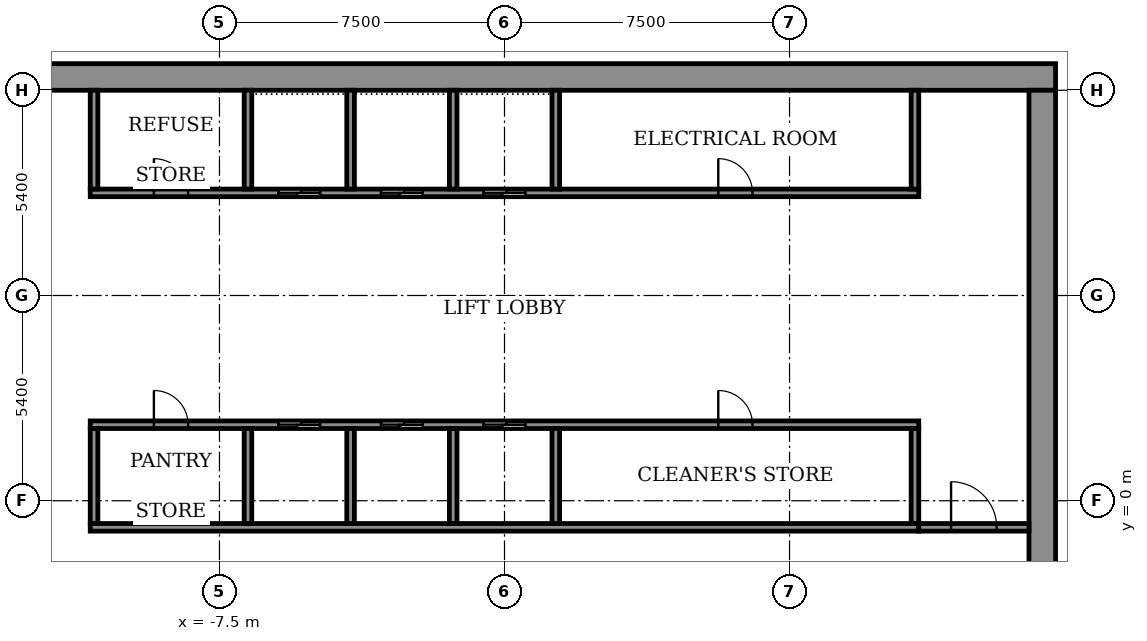
"""IFC4 building model, lengths in metres.
Left out: names, types, materials, properties, quantities, classifications, styles, units other than length and angle.
Written with IfcOpenShell. Run it as: python <this file> out.ifc"""

import sys

from ifc_helpers import new_model, si_unit, direction, frame, frame_2d, origin, place, context, subcontext, project, spatial, rectangle, extrude, element, fill, save


model = new_model("IFC4")
c1 = context("Model", 3, precision=1e-05, world=origin(), true_north=direction((0.0, 1.0)))
c2 = subcontext(c1, "Body", "Model", "MODEL_VIEW")
j1 = project(units=[si_unit("LENGTHUNIT", "METRE"), si_unit("PLANEANGLEUNIT", "RADIAN")], contexts=[c1])
p1 = place(None, origin())
s1 = spatial("IfcSite", under=j1, at=p1, CompositionType="ELEMENT")
p2 = place(p1, origin())
s2 = spatial("IfcBuilding", under=s1, at=p2, CompositionType="ELEMENT")
p3 = place(p2, frame((0.0, 0.0, 287.1)))
s3 = spatial("IfcBuildingStorey", under=s2, at=p3, CompositionType="ELEMENT", Elevation=287.1)
p4 = place(p3, frame((-14.5, 11.15, 0.0), z_axis=(0.0, 0.0, 1.0), x_axis=(1.0, 0.0, 0.0)))
e1 = element("IfcWall", 1, at=p4, inside=s3, PredefinedType="SHEAR", context=c2, shape_type="SweptSolid", body=[
    extrude(rectangle(XDim=29.0, YDim=0.7, at=frame_2d((14.5, 0.0))), origin(), (0.0, 0.0, 1.0), 3.6),
])
p5 = place(p3, frame((14.15, -10.8, 0.0), z_axis=(0.0, 0.0, 1.0), x_axis=(0.0, 1.0, 0.0)))
e2 = element("IfcWall", 2, at=p5, inside=s3, PredefinedType="SHEAR", context=c2, shape_type="SweptSolid", body=[
    extrude(rectangle(XDim=21.6, YDim=0.7, at=frame_2d((10.8, 0.0))), origin(), (0.0, 0.0, 1.0), 3.6),
])
p6 = place(p5, frame((1.2, 0.0, 0.0)))
e3 = element("IfcOpeningElement", 3, at=p6, cuts=e2, PredefinedType="OPENING", context=c2, shape_type="SweptSolid", body=[
    extrude(rectangle(XDim=1.2, YDim=2.1, at=frame_2d((0.6, 1.05))), frame((0.0, 0.36, 0.0), z_axis=(0.0, -1.0, 0.0), x_axis=(1.0, 0.0, 0.0)), (0.0, 0.0, 1.0), 0.72),
])
p7 = place(p3, frame((-10.9, -0.7, 0.0), z_axis=(0.0, 0.0, 1.0), x_axis=(1.0, 0.0, 0.0)))
e4 = element("IfcWall", 4, at=p7, inside=s3, PredefinedType="SHEAR", context=c2, shape_type="SweptSolid", body=[
    extrude(rectangle(XDim=21.8, YDim=0.2, at=frame_2d((10.9, 0.0))), origin(), (0.0, 0.0, 1.0), 3.05),
])
p8 = place(p3, frame((-10.9, 2.0, 0.0), z_axis=(0.0, 0.0, 1.0), x_axis=(1.0, 0.0, 0.0)))
e5 = element("IfcWall", 5, at=p8, inside=s3, PredefinedType="SHEAR", context=c2, shape_type="SweptSolid", body=[
    extrude(rectangle(XDim=21.8, YDim=0.2, at=frame_2d((10.9, 0.0))), origin(), (0.0, 0.0, 1.0), 3.05),
])
p9 = place(p8, frame((4.95, 0.0, 0.0)))
e6 = element("IfcOpeningElement", 6, at=p9, cuts=e5, PredefinedType="OPENING", context=c2, shape_type="SweptSolid", body=[
    extrude(rectangle(XDim=1.1, YDim=2.1, at=frame_2d((0.55, 1.05))), frame((0.0, 0.11, 0.0), z_axis=(0.0, -1.0, 0.0), x_axis=(1.0, 0.0, 0.0)), (0.0, 0.0, 1.0), 0.22),
])
p10 = place(p8, frame((7.65, 0.0, 0.0)))
e7 = element("IfcOpeningElement", 7, at=p10, cuts=e5, PredefinedType="OPENING", context=c2, shape_type="SweptSolid", body=[
    extrude(rectangle(XDim=1.1, YDim=2.1, at=frame_2d((0.55, 1.05))), frame((0.0, 0.11, 0.0), z_axis=(0.0, -1.0, 0.0), x_axis=(1.0, 0.0, 0.0)), (0.0, 0.0, 1.0), 0.22),
])
p11 = place(p8, frame((10.35, 0.0, 0.0)))
e8 = element("IfcOpeningElement", 8, at=p11, cuts=e5, PredefinedType="OPENING", context=c2, shape_type="SweptSolid", body=[
    extrude(rectangle(XDim=1.1, YDim=2.1, at=frame_2d((0.55, 1.05))), frame((0.0, 0.11, 0.0), z_axis=(0.0, -1.0, 0.0), x_axis=(1.0, 0.0, 0.0)), (0.0, 0.0, 1.0), 0.22),
])
p12 = place(p8, frame((1.675, 0.0, 0.0)))
e9 = element("IfcOpeningElement", 9, at=p12, cuts=e5, PredefinedType="OPENING", context=c2, shape_type="SweptSolid", body=[
    extrude(rectangle(XDim=0.9, YDim=2.1, at=frame_2d((0.45, 1.05))), frame((0.0, 0.11, 0.0), z_axis=(0.0, -1.0, 0.0), x_axis=(1.0, 0.0, 0.0)), (0.0, 0.0, 1.0), 0.22),
])
p13 = place(p8, frame((16.525, 0.0, 0.0)))
e10 = element("IfcOpeningElement", 10, at=p13, cuts=e5, PredefinedType="OPENING", context=c2, shape_type="SweptSolid", body=[
    extrude(rectangle(XDim=0.9, YDim=2.1, at=frame_2d((0.45, 1.05))), frame((0.0, 0.11, 0.0), z_axis=(0.0, -1.0, 0.0), x_axis=(1.0, 0.0, 0.0)), (0.0, 0.0, 1.0), 0.22),
])
p14 = place(p3, frame((-10.9, 8.1, 0.0), z_axis=(0.0, 0.0, 1.0), x_axis=(1.0, 0.0, 0.0)))
e11 = element("IfcWall", 11, at=p14, inside=s3, PredefinedType="SHEAR", context=c2, shape_type="SweptSolid", body=[
    extrude(rectangle(XDim=21.8, YDim=0.2, at=frame_2d((10.9, 0.0))), origin(), (0.0, 0.0, 1.0), 3.05),
])
p15 = place(p14, frame((4.95, 0.0, 0.0)))
e12 = element("IfcOpeningElement", 12, at=p15, cuts=e11, PredefinedType="OPENING", context=c2, shape_type="SweptSolid", body=[
    extrude(rectangle(XDim=1.1, YDim=2.1, at=frame_2d((0.55, 1.05))), frame((0.0, 0.11, 0.0), z_axis=(0.0, -1.0, 0.0), x_axis=(1.0, 0.0, 0.0)), (0.0, 0.0, 1.0), 0.22),
])
p16 = place(p14, frame((7.65, 0.0, 0.0)))
e13 = element("IfcOpeningElement", 13, at=p16, cuts=e11, PredefinedType="OPENING", context=c2, shape_type="SweptSolid", body=[
    extrude(rectangle(XDim=1.1, YDim=2.1, at=frame_2d((0.55, 1.05))), frame((0.0, 0.11, 0.0), z_axis=(0.0, -1.0, 0.0), x_axis=(1.0, 0.0, 0.0)), (0.0, 0.0, 1.0), 0.22),
])
p17 = place(p14, frame((10.35, 0.0, 0.0)))
e14 = element("IfcOpeningElement", 14, at=p17, cuts=e11, PredefinedType="OPENING", context=c2, shape_type="SweptSolid", body=[
    extrude(rectangle(XDim=1.1, YDim=2.1, at=frame_2d((0.55, 1.05))), frame((0.0, 0.11, 0.0), z_axis=(0.0, -1.0, 0.0), x_axis=(1.0, 0.0, 0.0)), (0.0, 0.0, 1.0), 0.22),
])
p18 = place(p14, frame((1.675, 0.0, 0.0)))
e15 = element("IfcOpeningElement", 15, at=p18, cuts=e11, PredefinedType="OPENING", context=c2, shape_type="SweptSolid", body=[
    extrude(rectangle(XDim=0.9, YDim=2.1, at=frame_2d((0.45, 1.05))), frame((0.0, 0.11, 0.0), z_axis=(0.0, -1.0, 0.0), x_axis=(1.0, 0.0, 0.0)), (0.0, 0.0, 1.0), 0.22),
])
p19 = place(p14, frame((16.525, 0.0, 0.0)))
e16 = element("IfcOpeningElement", 16, at=p19, cuts=e11, PredefinedType="OPENING", context=c2, shape_type="SweptSolid", body=[
    extrude(rectangle(XDim=0.9, YDim=2.1, at=frame_2d((0.45, 1.05))), frame((0.0, 0.11, 0.0), z_axis=(0.0, -1.0, 0.0), x_axis=(1.0, 0.0, 0.0)), (0.0, 0.0, 1.0), 0.22),
])
p20 = place(p3, frame((-10.8, -0.6, 0.0), z_axis=(0.0, 0.0, 1.0), x_axis=(0.0, 1.0, 0.0)))
e17 = element("IfcWall", 17, at=p20, inside=s3, PredefinedType="STANDARD", context=c2, shape_type="SweptSolid", body=[
    extrude(rectangle(XDim=2.5, YDim=0.2, at=frame_2d((1.25, 0.0))), origin(), (0.0, 0.0, 1.0), 3.05),
])
for number, where, z_axis, x_axis in (
    (18, (-6.75, -0.6, 0.0), (0.0, 0.0, 1.0), (0.0, 1.0, 0.0)),
    (19, (-4.05, -0.6, 0.0), (0.0, 0.0, 1.0), (0.0, 1.0, 0.0)),
    (20, (-1.35, -0.6, 0.0), (0.0, 0.0, 1.0), (0.0, 1.0, 0.0)),
    (21, (1.35, -0.6, 0.0), (0.0, 0.0, 1.0), (0.0, 1.0, 0.0)),
):
    element("IfcWall", number, at=place(p3, frame(where, z_axis=z_axis, x_axis=x_axis)), inside=s3, PredefinedType="SHEAR", context=c2, shape_type="SweptSolid", body=[
        extrude(rectangle(XDim=2.5, YDim=0.2, at=frame_2d((1.25, 0.0))), origin(), (0.0, 0.0, 1.0), 3.05),
    ])
p21 = place(p3, frame((10.8, -0.6, 0.0), z_axis=(0.0, 0.0, 1.0), x_axis=(0.0, 1.0, 0.0)))
e22 = element("IfcWall", 22, at=p21, inside=s3, PredefinedType="STANDARD", context=c2, shape_type="SweptSolid", body=[
    extrude(rectangle(XDim=2.5, YDim=0.2, at=frame_2d((1.25, 0.0))), origin(), (0.0, 0.0, 1.0), 3.05),
])
p22 = place(p3, frame((-10.8, 8.2, 0.0), z_axis=(0.0, 0.0, 1.0), x_axis=(0.0, 1.0, 0.0)))
e23 = element("IfcWall", 23, at=p22, inside=s3, PredefinedType="STANDARD", context=c2, shape_type="SweptSolid", body=[
    extrude(rectangle(XDim=2.6, YDim=0.2, at=frame_2d((1.3, 0.0))), origin(), (0.0, 0.0, 1.0), 3.05),
])
for number, where, z_axis, x_axis in (
    (24, (-6.75, 8.2, 0.0), (0.0, 0.0, 1.0), (0.0, 1.0, 0.0)),
    (25, (-4.05, 8.2, 0.0), (0.0, 0.0, 1.0), (0.0, 1.0, 0.0)),
    (26, (-1.35, 8.2, 0.0), (0.0, 0.0, 1.0), (0.0, 1.0, 0.0)),
    (27, (1.35, 8.2, 0.0), (0.0, 0.0, 1.0), (0.0, 1.0, 0.0)),
):
    element("IfcWall", number, at=place(p3, frame(where, z_axis=z_axis, x_axis=x_axis)), inside=s3, PredefinedType="SHEAR", context=c2, shape_type="SweptSolid", body=[
        extrude(rectangle(XDim=2.6, YDim=0.2, at=frame_2d((1.3, 0.0))), origin(), (0.0, 0.0, 1.0), 3.05),
    ])
p23 = place(p3, frame((10.8, 8.2, 0.0), z_axis=(0.0, 0.0, 1.0), x_axis=(0.0, 1.0, 0.0)))
e28 = element("IfcWall", 28, at=p23, inside=s3, PredefinedType="STANDARD", context=c2, shape_type="SweptSolid", body=[
    extrude(rectangle(XDim=2.6, YDim=0.2, at=frame_2d((1.3, 0.0))), origin(), (0.0, 0.0, 1.0), 3.05),
])
p24 = place(p3, frame((10.9, -0.7, 0.0), z_axis=(0.0, 0.0, 1.0), x_axis=(1.0, 0.0, 0.0)))
e29 = element("IfcWall", 29, at=p24, inside=s3, PredefinedType="STANDARD", context=c2, shape_type="SweptSolid", body=[
    extrude(rectangle(XDim=2.9, YDim=0.2, at=frame_2d((1.45, 0.0))), origin(), (0.0, 0.0, 1.0), 3.05),
])
p25 = place(p24, frame((0.85, 0.0, 0.0)))
e30 = element("IfcOpeningElement", 30, at=p25, cuts=e29, PredefinedType="OPENING", context=c2, shape_type="SweptSolid", body=[
    extrude(rectangle(XDim=1.2, YDim=2.1, at=frame_2d((0.6, 1.05))), frame((0.0, 0.11, 0.0), z_axis=(0.0, -1.0, 0.0), x_axis=(1.0, 0.0, 0.0)), (0.0, 0.0, 1.0), 0.22),
])
p26 = place(p9, origin())
e31 = element("IfcDoor", 31, at=p26, inside=s3, OperationType="SLIDING_TO_LEFT", PredefinedType="DOOR", context=c2, shape_type="SweptSolid", body=[
    extrude(rectangle(XDim=1.1, YDim=2.1, at=frame_2d((0.55, 1.05))), frame((0.0, 0.025, 0.0), z_axis=(0.0, -1.0, 0.0), x_axis=(1.0, 0.0, 0.0)), (0.0, 0.0, 1.0), 0.05),
])
fill(e6, e31)
p27 = place(p10, origin())
e32 = element("IfcDoor", 32, at=p27, inside=s3, OperationType="SLIDING_TO_LEFT", PredefinedType="DOOR", context=c2, shape_type="SweptSolid", body=[
    extrude(rectangle(XDim=1.1, YDim=2.1, at=frame_2d((0.55, 1.05))), frame((0.0, 0.025, 0.0), z_axis=(0.0, -1.0, 0.0), x_axis=(1.0, 0.0, 0.0)), (0.0, 0.0, 1.0), 0.05),
])
fill(e7, e32)
p28 = place(p11, origin())
e33 = element("IfcDoor", 33, at=p28, inside=s3, OperationType="SLIDING_TO_LEFT", PredefinedType="DOOR", context=c2, shape_type="SweptSolid", body=[
    extrude(rectangle(XDim=1.1, YDim=2.1, at=frame_2d((0.55, 1.05))), frame((0.0, 0.025, 0.0), z_axis=(0.0, -1.0, 0.0), x_axis=(1.0, 0.0, 0.0)), (0.0, 0.0, 1.0), 0.05),
])
fill(e8, e33)
p29 = place(p15, origin())
e34 = element("IfcDoor", 34, at=p29, inside=s3, OperationType="SLIDING_TO_LEFT", PredefinedType="DOOR", context=c2, shape_type="SweptSolid", body=[
    extrude(rectangle(XDim=1.1, YDim=2.1, at=frame_2d((0.55, 1.05))), frame((0.0, 0.025, 0.0), z_axis=(0.0, -1.0, 0.0), x_axis=(1.0, 0.0, 0.0)), (0.0, 0.0, 1.0), 0.05),
])
fill(e12, e34)
p30 = place(p16, origin())
e35 = element("IfcDoor", 35, at=p30, inside=s3, OperationType="SLIDING_TO_LEFT", PredefinedType="DOOR", context=c2, shape_type="SweptSolid", body=[
    extrude(rectangle(XDim=1.1, YDim=2.1, at=frame_2d((0.55, 1.05))), frame((0.0, 0.025, 0.0), z_axis=(0.0, -1.0, 0.0), x_axis=(1.0, 0.0, 0.0)), (0.0, 0.0, 1.0), 0.05),
])
fill(e13, e35)
p31 = place(p17, origin())
e36 = element("IfcDoor", 36, at=p31, inside=s3, OperationType="SLIDING_TO_LEFT", PredefinedType="DOOR", context=c2, shape_type="SweptSolid", body=[
    extrude(rectangle(XDim=1.1, YDim=2.1, at=frame_2d((0.55, 1.05))), frame((0.0, 0.025, 0.0), z_axis=(0.0, -1.0, 0.0), x_axis=(1.0, 0.0, 0.0)), (0.0, 0.0, 1.0), 0.05),
])
fill(e14, e36)
p32 = place(p12, origin())
e37 = element("IfcDoor", 37, at=p32, inside=s3, OperationType="SINGLE_SWING_RIGHT", PredefinedType="DOOR", context=c2, shape_type="SweptSolid", body=[
    extrude(rectangle(XDim=0.9, YDim=2.1, at=frame_2d((0.45, 1.05))), frame((0.0, 0.025, 0.0), z_axis=(0.0, -1.0, 0.0), x_axis=(1.0, 0.0, 0.0)), (0.0, 0.0, 1.0), 0.05),
])
fill(e9, e37)
p33 = place(p13, origin())
e38 = element("IfcDoor", 38, at=p33, inside=s3, OperationType="SINGLE_SWING_RIGHT", PredefinedType="DOOR", context=c2, shape_type="SweptSolid", body=[
    extrude(rectangle(XDim=0.9, YDim=2.1, at=frame_2d((0.45, 1.05))), frame((0.0, 0.025, 0.0), z_axis=(0.0, -1.0, 0.0), x_axis=(1.0, 0.0, 0.0)), (0.0, 0.0, 1.0), 0.05),
])
fill(e10, e38)
p34 = place(p18, origin())
e39 = element("IfcDoor", 39, at=p34, inside=s3, OperationType="SINGLE_SWING_RIGHT", PredefinedType="DOOR", context=c2, shape_type="SweptSolid", body=[
    extrude(rectangle(XDim=0.9, YDim=2.1, at=frame_2d((0.45, 1.05))), frame((0.0, 0.025, 0.0), z_axis=(0.0, -1.0, 0.0), x_axis=(1.0, 0.0, 0.0)), (0.0, 0.0, 1.0), 0.05),
])
fill(e15, e39)
p35 = place(p19, origin())
e40 = element("IfcDoor", 40, at=p35, inside=s3, OperationType="SINGLE_SWING_LEFT", PredefinedType="DOOR", context=c2, shape_type="SweptSolid", body=[
    extrude(rectangle(XDim=0.9, YDim=2.1, at=frame_2d((0.45, 1.05))), frame((0.0, 0.025, 0.0), z_axis=(0.0, -1.0, 0.0), x_axis=(1.0, 0.0, 0.0)), (0.0, 0.0, 1.0), 0.05),
])
fill(e16, e40)
p36 = place(p25, origin())
e41 = element("IfcDoor", 41, at=p36, inside=s3, OperationType="SINGLE_SWING_LEFT", PredefinedType="DOOR", context=c2, shape_type="SweptSolid", body=[
    extrude(rectangle(XDim=1.2, YDim=2.1, at=frame_2d((0.6, 1.05))), frame((0.0, 0.025, 0.0), z_axis=(0.0, -1.0, 0.0), x_axis=(1.0, 0.0, 0.0)), (0.0, 0.0, 1.0), 0.05),
])
fill(e30, e41)
save(model, sys.argv[1])
